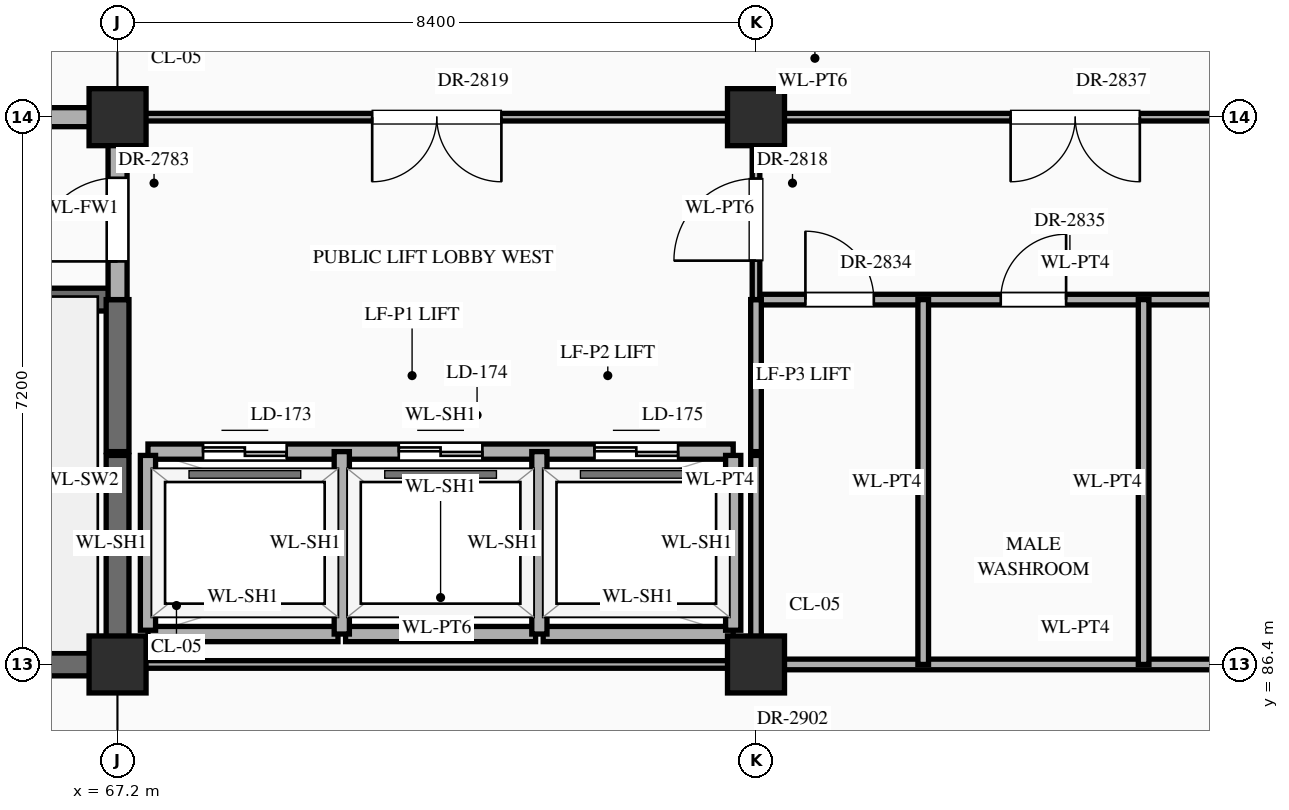
"""IFC4 building model, lengths in metres.
Left out: names, types, materials, properties, quantities, classifications, styles, units other than length and angle.
Written with IfcOpenShell. Run it as: python <this file> out.ifc"""

import sys

from ifc_helpers import new_model, si_unit, direction, frame, frame_2d, origin, origin_2d, place, context, subcontext, project, spatial, rectangle, extrude, element, fill, save


model = new_model("IFC4")
c1 = context("Model", 3, precision=1e-05, world=origin(), true_north=direction((0.0, 1.0)))
c2 = subcontext(c1, "Body", "Model", "MODEL_VIEW")
j1 = project(units=[si_unit("LENGTHUNIT", "METRE"), si_unit("PLANEANGLEUNIT", "RADIAN")], contexts=[c1])
p1 = place(None, origin())
s1 = spatial("IfcSite", under=j1, at=p1, CompositionType="ELEMENT")
p2 = place(p1, origin())
s2 = spatial("IfcBuilding", under=s1, at=p2, CompositionType="ELEMENT")
p3 = place(p2, frame((0.0, 0.0, 43.5)))
s3 = spatial("IfcBuildingStorey", under=s2, at=p3, CompositionType="ELEMENT", Elevation=43.5)
for number, where, z_axis, x_axis in (
    (1, (67.2, 86.4, 0.0), (0.0, 0.0, 1.0), (1.0, 0.0, 0.0)),
    (2, (67.2, 93.6, 0.0), (0.0, 0.0, 1.0), (1.0, 0.0, 0.0)),
    (3, (75.6, 86.4, 0.0), (0.0, 0.0, 1.0), (1.0, 0.0, 0.0)),
    (4, (75.6, 93.6, 0.0), (0.0, 0.0, 1.0), (1.0, 0.0, 0.0)),
):
    element("IfcColumn", number, at=place(p3, frame(where, z_axis=z_axis, x_axis=x_axis)), inside=s3, PredefinedType="COLUMN", context=c2, shape_type="SweptSolid", body=[
        extrude(rectangle(XDim=0.75, YDim=0.75, at=origin_2d()), origin(), (0.0, 0.0, 1.0), 4.2),
    ])
p4 = place(p3, frame((58.8, 86.4, 0.0), z_axis=(0.0, 0.0, 1.0), x_axis=(1.0, 0.0, 0.0)))
e5 = element("IfcWall", 5, at=p4, inside=s3, PredefinedType="SHEAR", context=c2, shape_type="SweptSolid", body=[
    extrude(rectangle(XDim=8.4, YDim=0.3, at=frame_2d((4.2, 0.0))), origin(), (0.0, 0.0, 1.0), 3.95),
])
p5 = place(p3, frame((67.25, 86.4, 0.0), z_axis=(0.0, 0.0, 1.0), x_axis=(1.0, 0.0, 0.0)))
e6 = element("IfcWall", 6, at=p5, inside=s3, PredefinedType="STANDARD", context=c2, shape_type="SweptSolid", body=[
    extrude(rectangle(XDim=8.3, YDim=0.1, at=frame_2d((4.15, 0.0))), origin(), (0.0, 0.0, 1.0), 3.1),
])
p6 = place(p3, frame((75.6, 86.4, 0.0), z_axis=(0.0, 0.0, 1.0), x_axis=(1.0, 0.0, 0.0)))
e7 = element("IfcWall", 7, at=p6, inside=s3, PredefinedType="STANDARD", context=c2, shape_type="SweptSolid", body=[
    extrude(rectangle(XDim=8.4, YDim=0.14, at=frame_2d((4.2, 0.0))), origin(), (0.0, 0.0, 1.0), 3.1),
])
for number, where, z_axis, x_axis in (
    (8, (67.6, 86.8, 0.0), (0.0, 0.0, 1.0), (1.0, 0.0, 0.0)),
    (9, (70.2, 86.8, 0.0), (0.0, 0.0, 1.0), (1.0, 0.0, 0.0)),
    (10, (72.8, 86.8, 0.0), (0.0, 0.0, 1.0), (1.0, 0.0, 0.0)),
):
    element("IfcWall", number, at=place(p3, frame(where, z_axis=z_axis, x_axis=x_axis)), inside=s3, PredefinedType="STANDARD", context=c2, shape_type="SweptSolid", body=[
        extrude(rectangle(XDim=2.5, YDim=0.2, at=frame_2d((1.25, 0.0))), origin(), (0.0, 0.0, 1.0), 3.95),
    ])
p7 = place(p3, frame((67.6, 89.2, 0.0), z_axis=(0.0, 0.0, 1.0), x_axis=(1.0, 0.0, 0.0)))
e11 = element("IfcWall", 11, at=p7, inside=s3, PredefinedType="STANDARD", context=c2, shape_type="SweptSolid", body=[
    extrude(rectangle(XDim=7.7, YDim=0.2, at=frame_2d((3.85, 0.0))), origin(), (0.0, 0.0, 1.0), 3.95),
])
p8 = place(p7, frame((0.725, 0.0, 0.0)))
e12 = element("IfcOpeningElement", 12, at=p8, cuts=e11, PredefinedType="OPENING", context=c2, shape_type="SweptSolid", body=[
    extrude(rectangle(XDim=1.1, YDim=2.15, at=frame_2d((0.55, 1.075))), frame((0.0, 0.112, 0.0), z_axis=(0.0, -1.0, 0.0), x_axis=(1.0, 0.0, 0.0)), (0.0, 0.0, 1.0), 0.224),
])
p9 = place(p7, frame((3.3, 0.0, 0.0)))
e13 = element("IfcOpeningElement", 13, at=p9, cuts=e11, PredefinedType="OPENING", context=c2, shape_type="SweptSolid", body=[
    extrude(rectangle(XDim=1.1, YDim=2.15, at=frame_2d((0.55, 1.075))), frame((0.0, 0.112, 0.0), z_axis=(0.0, -1.0, 0.0), x_axis=(1.0, 0.0, 0.0)), (0.0, 0.0, 1.0), 0.224),
])
p10 = place(p7, frame((5.875, 0.0, 0.0)))
e14 = element("IfcOpeningElement", 14, at=p10, cuts=e11, PredefinedType="OPENING", context=c2, shape_type="SweptSolid", body=[
    extrude(rectangle(XDim=1.1, YDim=2.15, at=frame_2d((0.55, 1.075))), frame((0.0, 0.112, 0.0), z_axis=(0.0, -1.0, 0.0), x_axis=(1.0, 0.0, 0.0)), (0.0, 0.0, 1.0), 0.224),
])
p11 = place(p3, frame((58.8, 91.2, 0.0), z_axis=(0.0, 0.0, 1.0), x_axis=(1.0, 0.0, 0.0)))
e15 = element("IfcWall", 15, at=p11, inside=s3, PredefinedType="SHEAR", context=c2, shape_type="SweptSolid", body=[
    extrude(rectangle(XDim=8.4, YDim=0.3, at=frame_2d((4.2, 0.0))), origin(), (0.0, 0.0, 1.0), 3.95),
])
p12 = place(p11, frame((0.65, 0.0, 0.0)))
e16 = element("IfcOpeningElement", 16, at=p12, cuts=e15, PredefinedType="OPENING", context=c2, shape_type="SweptSolid", body=[
    extrude(rectangle(XDim=1.1, YDim=2.2, at=frame_2d((0.55, 1.1))), frame((0.0, 0.162, 0.0), z_axis=(0.0, -1.0, 0.0), x_axis=(1.0, 0.0, 0.0)), (0.0, 0.0, 1.0), 0.324),
])
p13 = place(p3, frame((75.6, 91.2, 0.0), z_axis=(0.0, 0.0, 1.0), x_axis=(1.0, 0.0, 0.0)))
e17 = element("IfcWall", 17, at=p13, inside=s3, PredefinedType="STANDARD", context=c2, shape_type="SweptSolid", body=[
    extrude(rectangle(XDim=8.4, YDim=0.14, at=frame_2d((4.2, 0.0))), origin(), (0.0, 0.0, 1.0), 3.95),
])
p14 = place(p13, frame((0.65, 0.0, 0.0)))
e18 = element("IfcOpeningElement", 18, at=p14, cuts=e17, PredefinedType="OPENING", context=c2, shape_type="SweptSolid", body=[
    extrude(rectangle(XDim=0.9, YDim=2.15, at=frame_2d((0.45, 1.075))), frame((0.0, 0.082, 0.0), z_axis=(0.0, -1.0, 0.0), x_axis=(1.0, 0.0, 0.0)), (0.0, 0.0, 1.0), 0.164),
])
p15 = place(p13, frame((3.22, 0.0, 0.0)))
e19 = element("IfcOpeningElement", 19, at=p15, cuts=e17, PredefinedType="OPENING", context=c2, shape_type="SweptSolid", body=[
    extrude(rectangle(XDim=0.86, YDim=2.1, at=frame_2d((0.43, 1.05))), frame((0.0, 0.082, 0.0), z_axis=(0.0, -1.0, 0.0), x_axis=(1.0, 0.0, 0.0)), (0.0, 0.0, 1.0), 0.164),
])
p16 = place(p13, frame((6.32, 0.0, 0.0)))
e20 = element("IfcOpeningElement", 20, at=p16, cuts=e17, PredefinedType="OPENING", context=c2, shape_type="SweptSolid", body=[
    extrude(rectangle(XDim=0.86, YDim=2.1, at=frame_2d((0.43, 1.05))), frame((0.0, 0.082, 0.0), z_axis=(0.0, -1.0, 0.0), x_axis=(1.0, 0.0, 0.0)), (0.0, 0.0, 1.0), 0.164),
])
p17 = place(p3, frame((58.8, 93.6, 0.0), z_axis=(0.0, 0.0, 1.0), x_axis=(1.0, 0.0, 0.0)))
e21 = element("IfcWall", 21, at=p17, inside=s3, PredefinedType="STANDARD", context=c2, shape_type="SweptSolid", body=[
    extrude(rectangle(XDim=8.4, YDim=0.25, at=frame_2d((4.2, 0.0))), origin(), (0.0, 0.0, 1.0), 3.1),
])
p18 = place(p17, frame((3.45, 0.0, 0.0)))
e22 = element("IfcOpeningElement", 22, at=p18, cuts=e21, PredefinedType="OPENING", context=c2, shape_type="SweptSolid", body=[
    extrude(rectangle(XDim=1.5, YDim=2.25, at=frame_2d((0.75, 1.125))), frame((0.0, 0.137, 0.0), z_axis=(0.0, -1.0, 0.0), x_axis=(1.0, 0.0, 0.0)), (0.0, 0.0, 1.0), 0.274),
])
p19 = place(p3, frame((67.2, 93.6, 0.0), z_axis=(0.0, 0.0, 1.0), x_axis=(1.0, 0.0, 0.0)))
e23 = element("IfcWall", 23, at=p19, inside=s3, PredefinedType="STANDARD", context=c2, shape_type="SweptSolid", body=[
    extrude(rectangle(XDim=33.6, YDim=0.1, at=frame_2d((16.8, 0.0))), origin(), (0.0, 0.0, 1.0), 3.1),
])
p20 = place(p19, frame((3.35, 0.0, 0.0)))
e24 = element("IfcOpeningElement", 24, at=p20, cuts=e23, PredefinedType="OPENING", context=c2, shape_type="SweptSolid", body=[
    extrude(rectangle(XDim=1.7, YDim=2.45, at=frame_2d((0.85, 1.225))), frame((0.0, 0.062, 0.0), z_axis=(0.0, -1.0, 0.0), x_axis=(1.0, 0.0, 0.0)), (0.0, 0.0, 1.0), 0.124),
])
p21 = place(p19, frame((28.675, 0.0, 0.0)))
e25 = element("IfcOpeningElement", 25, at=p21, cuts=e23, PredefinedType="OPENING", context=c2, shape_type="SweptSolid", body=[
    extrude(rectangle(XDim=1.45, YDim=2.3, at=frame_2d((0.725, 1.15))), frame((0.0, 0.062, 0.0), z_axis=(0.0, -1.0, 0.0), x_axis=(1.0, 0.0, 0.0)), (0.0, 0.0, 1.0), 0.124),
])
p22 = place(p19, frame((11.75, 0.0, 0.0)))
e26 = element("IfcOpeningElement", 26, at=p22, cuts=e23, PredefinedType="OPENING", context=c2, shape_type="SweptSolid", body=[
    extrude(rectangle(XDim=1.7, YDim=2.45, at=frame_2d((0.85, 1.225))), frame((0.0, 0.062, 0.0), z_axis=(0.0, -1.0, 0.0), x_axis=(1.0, 0.0, 0.0)), (0.0, 0.0, 1.0), 0.124),
])
p23 = place(p19, frame((17.837, 0.0, 0.0)))
e27 = element("IfcOpeningElement", 27, at=p23, cuts=e23, PredefinedType="OPENING", context=c2, shape_type="SweptSolid", body=[
    extrude(rectangle(XDim=1.02, YDim=2.4, at=frame_2d((0.51, 1.2))), frame((0.0, 0.062, 0.0), z_axis=(0.0, -1.0, 0.0), x_axis=(1.0, 0.0, 0.0)), (0.0, 0.0, 1.0), 0.124),
])
p24 = place(p19, frame((20.47, 0.0, 0.0)))
e28 = element("IfcOpeningElement", 28, at=p24, cuts=e23, PredefinedType="OPENING", context=c2, shape_type="SweptSolid", body=[
    extrude(rectangle(XDim=1.06, YDim=2.4, at=frame_2d((0.53, 1.2))), frame((0.0, 0.062, 0.0), z_axis=(0.0, -1.0, 0.0), x_axis=(1.0, 0.0, 0.0)), (0.0, 0.0, 1.0), 0.124),
])
p25 = place(p19, frame((23.083, 0.0, 0.0)))
e29 = element("IfcOpeningElement", 29, at=p25, cuts=e23, PredefinedType="OPENING", context=c2, shape_type="SweptSolid", body=[
    extrude(rectangle(XDim=1.14, YDim=2.4, at=frame_2d((0.57, 1.2))), frame((0.0, 0.062, 0.0), z_axis=(0.0, -1.0, 0.0), x_axis=(1.0, 0.0, 0.0)), (0.0, 0.0, 1.0), 0.124),
])
p26 = place(p3, frame((67.2, 86.45, 0.0), z_axis=(0.0, 0.0, 1.0), x_axis=(0.0, 1.0, 0.0)))
e30 = element("IfcWall", 30, at=p26, inside=s3, PredefinedType="SHEAR", context=c2, shape_type="SweptSolid", body=[
    extrude(rectangle(XDim=2.7, YDim=0.3, at=frame_2d((1.35, 0.0))), origin(), (0.0, 0.0, 1.0), 3.95),
])
p27 = place(p3, frame((67.2, 89.2, 0.0), z_axis=(0.0, 0.0, 1.0), x_axis=(0.0, 1.0, 0.0)))
e31 = element("IfcWall", 31, at=p27, inside=s3, PredefinedType="SHEAR", context=c2, shape_type="SweptSolid", body=[
    extrude(rectangle(XDim=2.0, YDim=0.3, at=frame_2d((1.0, 0.0))), origin(), (0.0, 0.0, 1.0), 3.95),
])
p28 = place(p3, frame((67.2, 91.2, 0.0), z_axis=(0.0, 0.0, 1.0), x_axis=(0.0, 1.0, 0.0)))
e32 = element("IfcWall", 32, at=p28, inside=s3, PredefinedType="STANDARD", context=c2, shape_type="SweptSolid", body=[
    extrude(rectangle(XDim=2.4, YDim=0.25, at=frame_2d((1.2, 0.0))), origin(), (0.0, 0.0, 1.0), 3.2),
])
p29 = place(p28, frame((0.502, 0.0, 0.0)))
e33 = element("IfcOpeningElement", 33, at=p29, cuts=e32, PredefinedType="OPENING", context=c2, shape_type="SweptSolid", body=[
    extrude(rectangle(XDim=1.1, YDim=2.2, at=frame_2d((0.55, 1.1))), frame((0.0, 0.137, 0.0), z_axis=(0.0, -1.0, 0.0), x_axis=(1.0, 0.0, 0.0)), (0.0, 0.0, 1.0), 0.274),
])
p30 = place(p3, frame((67.6, 86.85, 0.0), z_axis=(0.0, 0.0, 1.0), x_axis=(0.0, 1.0, 0.0)))
e34 = element("IfcWall", 34, at=p30, inside=s3, PredefinedType="STANDARD", context=c2, shape_type="SweptSolid", body=[
    extrude(rectangle(XDim=2.3, YDim=0.2, at=frame_2d((1.15, 0.0))), origin(), (0.0, 0.0, 1.0), 3.95),
])
for number, where, z_axis, x_axis in (
    (35, (70.15, 86.8, 0.0), (0.0, 0.0, 1.0), (0.0, 1.0, 0.0)),
    (36, (72.75, 86.8, 0.0), (0.0, 0.0, 1.0), (0.0, 1.0, 0.0)),
):
    element("IfcWall", number, at=place(p3, frame(where, z_axis=z_axis, x_axis=x_axis)), inside=s3, PredefinedType="STANDARD", context=c2, shape_type="SweptSolid", body=[
        extrude(rectangle(XDim=2.4, YDim=0.2, at=frame_2d((1.2, 0.0))), origin(), (0.0, 0.0, 1.0), 3.95),
    ])
p31 = place(p3, frame((75.3, 86.85, 0.0), z_axis=(0.0, 0.0, 1.0), x_axis=(0.0, 1.0, 0.0)))
e37 = element("IfcWall", 37, at=p31, inside=s3, PredefinedType="STANDARD", context=c2, shape_type="SweptSolid", body=[
    extrude(rectangle(XDim=2.3, YDim=0.2, at=frame_2d((1.15, 0.0))), origin(), (0.0, 0.0, 1.0), 3.95),
])
p32 = place(p3, frame((75.6, 86.45, 0.0), z_axis=(0.0, 0.0, 1.0), x_axis=(0.0, 1.0, 0.0)))
e38 = element("IfcWall", 38, at=p32, inside=s3, PredefinedType="STANDARD", context=c2, shape_type="SweptSolid", body=[
    extrude(rectangle(XDim=2.7, YDim=0.14, at=frame_2d((1.35, 0.0))), origin(), (0.0, 0.0, 1.0), 3.2),
])
p33 = place(p3, frame((75.6, 89.2, 0.0), z_axis=(0.0, 0.0, 1.0), x_axis=(0.0, 1.0, 0.0)))
e39 = element("IfcWall", 39, at=p33, inside=s3, PredefinedType="STANDARD", context=c2, shape_type="SweptSolid", body=[
    extrude(rectangle(XDim=2.0, YDim=0.14, at=frame_2d((1.0, 0.0))), origin(), (0.0, 0.0, 1.0), 3.2),
])
p34 = place(p3, frame((75.6, 91.2, 0.0), z_axis=(0.0, 0.0, 1.0), x_axis=(0.0, 1.0, 0.0)))
e40 = element("IfcWall", 40, at=p34, inside=s3, PredefinedType="STANDARD", context=c2, shape_type="SweptSolid", body=[
    extrude(rectangle(XDim=2.4, YDim=0.1, at=frame_2d((1.2, 0.0))), origin(), (0.0, 0.0, 1.0), 3.2),
])
p35 = place(p34, frame((0.512, 0.0, 0.0)))
e41 = element("IfcOpeningElement", 41, at=p35, cuts=e40, PredefinedType="OPENING", context=c2, shape_type="SweptSolid", body=[
    extrude(rectangle(XDim=1.08, YDim=2.25, at=frame_2d((0.54, 1.125))), frame((0.0, 0.062, 0.0), z_axis=(0.0, -1.0, 0.0), x_axis=(1.0, 0.0, 0.0)), (0.0, 0.0, 1.0), 0.124),
])
for number, where, z_axis, x_axis in (
    (42, (77.8, 86.4, 0.0), (0.0, 0.0, 1.0), (0.0, 1.0, 0.0)),
    (43, (80.7, 86.4, 0.0), (0.0, 0.0, 1.0), (0.0, 1.0, 0.0)),
):
    element("IfcWall", number, at=place(p3, frame(where, z_axis=z_axis, x_axis=x_axis)), inside=s3, PredefinedType="STANDARD", context=c2, shape_type="SweptSolid", body=[
        extrude(rectangle(XDim=4.8, YDim=0.14, at=frame_2d((2.4, 0.0))), origin(), (0.0, 0.0, 1.0), 3.95),
    ])
p36 = place(p8, origin())
e44 = element("IfcDoor", 44, at=p36, inside=s3, OperationType="DOUBLE_DOOR_SLIDING", PredefinedType="DOOR", context=c2, shape_type="SweptSolid", body=[
    extrude(rectangle(XDim=1.1, YDim=2.15, at=frame_2d((0.55, 1.075))), frame((0.0, 0.025, 0.0), z_axis=(0.0, -1.0, 0.0), x_axis=(1.0, 0.0, 0.0)), (0.0, 0.0, 1.0), 0.05),
])
fill(e12, e44)
p37 = place(p9, origin())
e45 = element("IfcDoor", 45, at=p37, inside=s3, OperationType="DOUBLE_DOOR_SLIDING", PredefinedType="DOOR", context=c2, shape_type="SweptSolid", body=[
    extrude(rectangle(XDim=1.1, YDim=2.15, at=frame_2d((0.55, 1.075))), frame((0.0, 0.025, 0.0), z_axis=(0.0, -1.0, 0.0), x_axis=(1.0, 0.0, 0.0)), (0.0, 0.0, 1.0), 0.05),
])
fill(e13, e45)
p38 = place(p10, origin())
e46 = element("IfcDoor", 46, at=p38, inside=s3, OperationType="DOUBLE_DOOR_SLIDING", PredefinedType="DOOR", context=c2, shape_type="SweptSolid", body=[
    extrude(rectangle(XDim=1.1, YDim=2.15, at=frame_2d((0.55, 1.075))), frame((0.0, 0.025, 0.0), z_axis=(0.0, -1.0, 0.0), x_axis=(1.0, 0.0, 0.0)), (0.0, 0.0, 1.0), 0.05),
])
fill(e14, e46)
p39 = place(p29, origin())
e47 = element("IfcDoor", 47, at=p39, inside=s3, OperationType="SINGLE_SWING_LEFT", PredefinedType="DOOR", context=c2, shape_type="SweptSolid", body=[
    extrude(rectangle(XDim=1.1, YDim=2.2, at=frame_2d((0.55, 1.1))), frame((0.0, 0.025, 0.0), z_axis=(0.0, -1.0, 0.0), x_axis=(1.0, 0.0, 0.0)), (0.0, 0.0, 1.0), 0.05),
])
fill(e33, e47)
p40 = place(p35, origin())
e48 = element("IfcDoor", 48, at=p40, inside=s3, OperationType="SINGLE_SWING_LEFT", PredefinedType="DOOR", context=c2, shape_type="SweptSolid", body=[
    extrude(rectangle(XDim=1.08, YDim=2.25, at=frame_2d((0.54, 1.125))), frame((0.0, 0.025, 0.0), z_axis=(0.0, -1.0, 0.0), x_axis=(1.0, 0.0, 0.0)), (0.0, 0.0, 1.0), 0.05),
])
fill(e41, e48)
p41 = place(p20, frame((1.7, 0.0, 0.0), z_axis=(0.0, 0.0, 1.0), x_axis=(-1.0, 0.0, 0.0)))
e49 = element("IfcDoor", 49, at=p41, inside=s3, OperationType="DOUBLE_DOOR_SINGLE_SWING", PredefinedType="DOOR", context=c2, shape_type="SweptSolid", body=[
    extrude(rectangle(XDim=1.7, YDim=2.45, at=frame_2d((0.85, 1.225))), frame((0.0, 0.025, 0.0), z_axis=(0.0, -1.0, 0.0), x_axis=(1.0, 0.0, 0.0)), (0.0, 0.0, 1.0), 0.05),
])
fill(e24, e49)
p42 = place(p14, origin())
e50 = element("IfcDoor", 50, at=p42, inside=s3, OperationType="SINGLE_SWING_LEFT", PredefinedType="DOOR", context=c2, shape_type="SweptSolid", body=[
    extrude(rectangle(XDim=0.9, YDim=2.15, at=frame_2d((0.45, 1.075))), frame((0.0, 0.025, 0.0), z_axis=(0.0, -1.0, 0.0), x_axis=(1.0, 0.0, 0.0)), (0.0, 0.0, 1.0), 0.05),
])
fill(e18, e50)
p43 = place(p15, origin())
e51 = element("IfcDoor", 51, at=p43, inside=s3, OperationType="SINGLE_SWING_RIGHT", PredefinedType="DOOR", context=c2, shape_type="SweptSolid", body=[
    extrude(rectangle(XDim=0.86, YDim=2.1, at=frame_2d((0.43, 1.05))), frame((0.0, 0.025, 0.0), z_axis=(0.0, -1.0, 0.0), x_axis=(1.0, 0.0, 0.0)), (0.0, 0.0, 1.0), 0.05),
])
fill(e19, e51)
p44 = place(p22, frame((1.7, 0.0, 0.0), z_axis=(0.0, 0.0, 1.0), x_axis=(-1.0, 0.0, 0.0)))
e52 = element("IfcDoor", 52, at=p44, inside=s3, OperationType="DOUBLE_DOOR_SINGLE_SWING", PredefinedType="DOOR", context=c2, shape_type="SweptSolid", body=[
    extrude(rectangle(XDim=1.7, YDim=2.45, at=frame_2d((0.85, 1.225))), frame((0.0, 0.025, 0.0), z_axis=(0.0, -1.0, 0.0), x_axis=(1.0, 0.0, 0.0)), (0.0, 0.0, 1.0), 0.05),
])
fill(e26, e52)
save(model, sys.argv[1])
